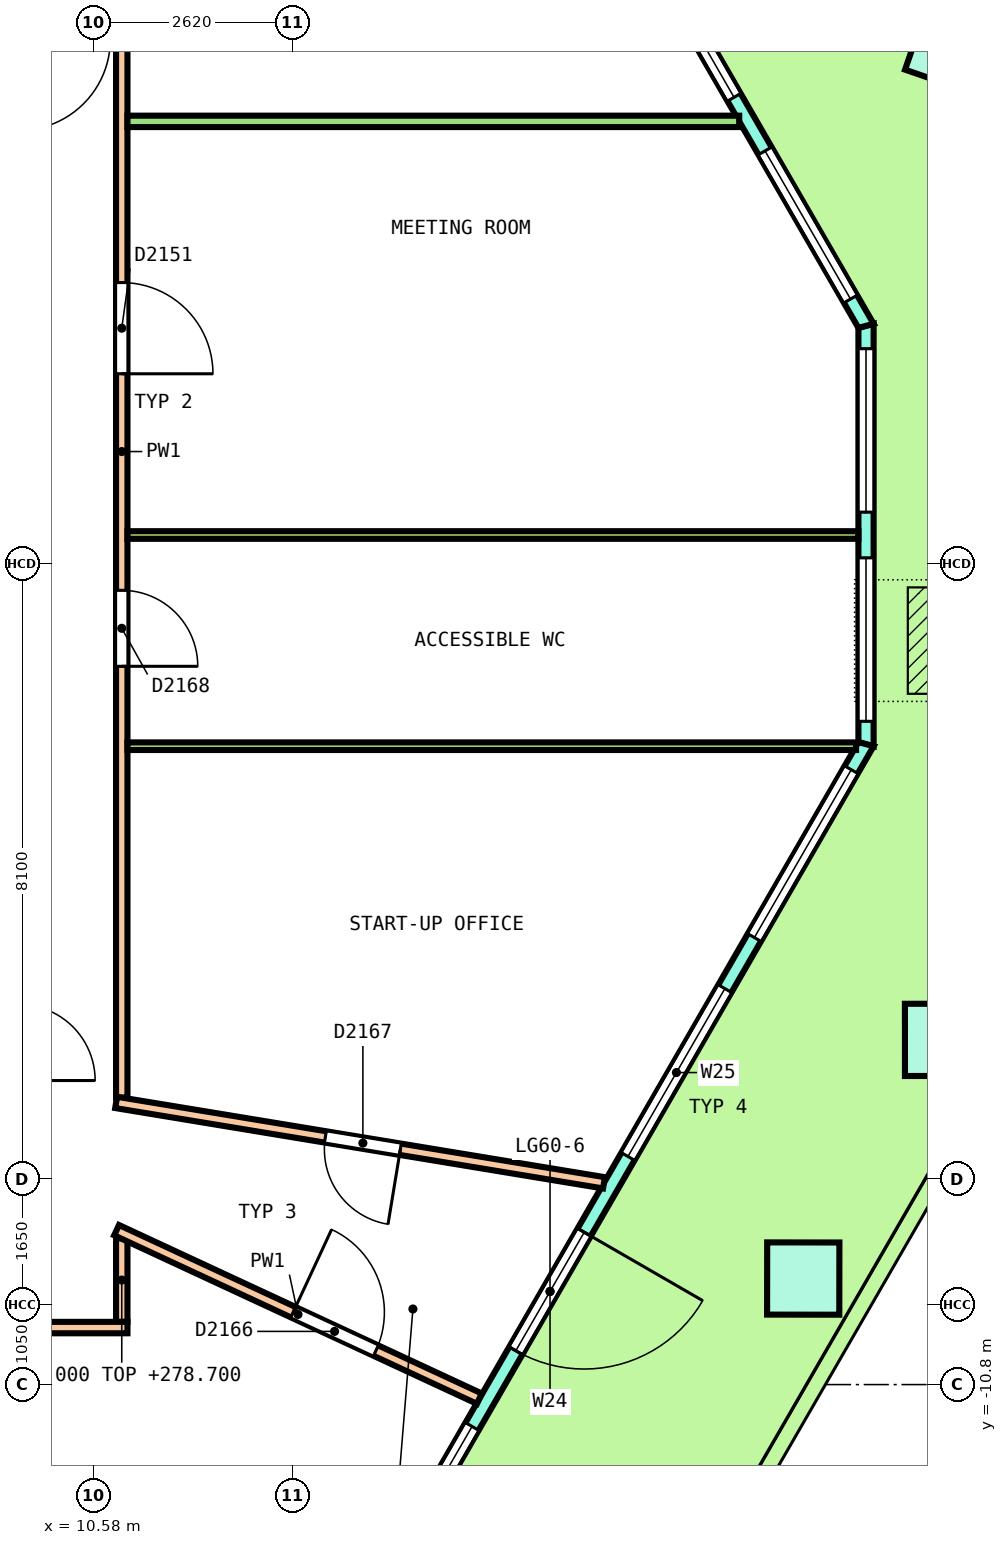
"""IFC4 building model, lengths in metres.
Left out: names, types, materials, properties, quantities, classifications, styles, units other than length and angle.
Written with IfcOpenShell. Run it as: python <this file> out.ifc"""

import sys

from ifc_helpers import new_model, si_unit, direction, frame, frame_2d, origin, origin_2d, place, context, subcontext, project, spatial, polyline, rectangle, outline, extrude, element, fill, save


model = new_model("IFC4")
c1 = context("Model", 3, precision=1e-05, world=origin(), true_north=direction((0.0, 1.0)))
c2 = subcontext(c1, "Body", "Model", "MODEL_VIEW")
j1 = project(units=[si_unit("LENGTHUNIT", "METRE"), si_unit("PLANEANGLEUNIT", "RADIAN")], contexts=[c1])
p1 = place(None, origin())
s1 = spatial("IfcSite", under=j1, at=p1, CompositionType="ELEMENT")
p2 = place(p1, origin())
s2 = spatial("IfcBuilding", under=s1, at=p2, CompositionType="ELEMENT")
p3 = place(p2, frame((0.0, 0.0, 275.0)))
s3 = spatial("IfcBuildingStorey", under=s2, at=p3, CompositionType="ELEMENT", Elevation=275.0)
p4 = place(p3, frame((21.859, 6.793, 0.0), z_axis=(0.021727164481, 0.02506980517, 0.999449566107), x_axis=(-0.500266190079, 0.865803780998, -0.010842134187)))
e1 = element("IfcColumn", 1, at=p4, inside=s3, PredefinedType="COLUMN", context=c2, shape_type="SweptSolid", body=[
    extrude(rectangle(XDim=0.95, YDim=0.95, at=origin_2d()), origin(), (0.0, 0.0, 1.0), 3.652),
])
p5 = place(p3, frame((19.916, -9.405, 0.0), z_axis=(0.003611945175, 0.00628746012, 0.999973710503), x_axis=(0.499382072477, 0.866351526517, -0.007251081967)))
e2 = element("IfcColumn", 2, at=p5, inside=s3, PredefinedType="COLUMN", context=c2, shape_type="SweptSolid", body=[
    extrude(rectangle(XDim=0.95, YDim=0.95, at=origin_2d()), origin(), (0.0, 0.0, 1.0), 3.65),
])
p6 = place(p3, frame((21.729, -6.265, 0.0), z_axis=(0.010900423214, 0.018858400897, 0.999762742599), x_axis=(0.499728924135, 0.865907930491, -0.021782063614)))
e3 = element("IfcColumn", 3, at=p6, inside=s3, PredefinedType="COLUMN", context=c2, shape_type="SweptSolid", body=[
    extrude(rectangle(XDim=0.95, YDim=0.95, at=origin_2d()), origin(), (0.0, 0.0, 1.0), 3.651),
])
p7 = place(p3, frame((20.741, -2.375, 0.0), z_axis=(0.0, 0.0, 1.0), x_axis=(0.0, 1.0, 0.0)))
e4 = element("IfcWall", 4, at=p7, inside=s3, PredefinedType="SOLIDWALL", context=c2, shape_type="SweptSolid", body=[
    extrude(outline(polyline([(-0.027, -0.1), (1.084, -0.1), (2.196, -0.1), (3.307, -0.1), (4.419, -0.1), (5.53, -0.1), (5.477, 0.1), (4.387, 0.1), (3.297, 0.1), (2.207, 0.1), (1.117, 0.1), (0.027, 0.1), (-0.027, -0.1)])), origin(), (0.0, 0.0, 1.0), 3.7),
])
p8 = place(p7, frame((0.301, 0.0, 0.1)))
e5 = element("IfcOpeningElement", 5, at=p8, cuts=e4, PredefinedType="OPENING", context=c2, shape_type="SweptSolid", body=[
    extrude(rectangle(XDim=2.15, YDim=2.75, at=frame_2d((1.075, 1.375))), frame((0.0, 0.11, 0.0), z_axis=(0.0, -1.0, 0.0), x_axis=(1.0, 0.0, 0.0)), (0.0, 0.0, 1.0), 0.22),
])
p9 = place(p7, frame((3.052, 0.0, 0.1)))
e6 = element("IfcOpeningElement", 6, at=p9, cuts=e4, PredefinedType="OPENING", context=c2, shape_type="SweptSolid", body=[
    extrude(rectangle(XDim=2.15, YDim=2.75, at=frame_2d((1.075, 1.375))), frame((0.0, 0.11, 0.0), z_axis=(0.0, -1.0, 0.0), x_axis=(1.0, 0.0, 0.0)), (0.0, 0.0, 1.0), 0.22),
])
p10 = place(p3, frame((20.741, 3.129, 0.0), z_axis=(0.0, 0.0, 1.0), x_axis=(-0.500005204625, 0.866022398872, 0.0)))
e7 = element("IfcWall", 7, at=p10, inside=s3, PredefinedType="SOLIDWALL", context=c2, shape_type="SweptSolid", body=[
    extrude(outline(polyline([(-0.027, -0.1), (0.998, -0.1), (2.023, -0.1), (3.048, -0.1), (4.073, -0.1), (5.098, -0.1), (6.124, -0.1), (7.148, -0.1), (8.174, -0.1), (9.198, -0.1), (10.224, -0.1), (11.249, -0.1), (12.274, -0.1), (13.299, -0.1), (14.324, -0.1), (15.349, -0.1), (15.295, 0.1), (14.277, 0.1), (13.259, 0.1), (12.241, 0.1), (11.224, 0.1), (10.206, 0.1), (9.188, 0.1), (8.17, 0.1), (7.152, 0.1), (6.134, 0.1), (5.116, 0.1), (4.098, 0.1), (3.081, 0.1), (2.063, 0.1), (1.045, 0.1), (0.027, 0.1), (-0.027, -0.1)])), origin(), (0.0, 0.0, 1.0), 3.7),
])
p11 = place(p10, frame((0.407, 0.0, 0.1)))
e8 = element("IfcOpeningElement", 8, at=p11, cuts=e7, PredefinedType="OPENING", context=c2, shape_type="SweptSolid", body=[
    extrude(rectangle(XDim=2.25, YDim=2.75, at=frame_2d((1.125, 1.375))), frame((0.0, 0.11, 0.0), z_axis=(0.0, -1.0, 0.0), x_axis=(1.0, 0.0, 0.0)), (0.0, 0.0, 1.0), 0.22),
])
p12 = place(p10, frame((3.472, 0.0, 0.1)))
e9 = element("IfcOpeningElement", 9, at=p12, cuts=e7, PredefinedType="OPENING", context=c2, shape_type="SweptSolid", body=[
    extrude(rectangle(XDim=2.25, YDim=2.75, at=frame_2d((1.125, 1.375))), frame((0.0, 0.11, 0.0), z_axis=(0.0, -1.0, 0.0), x_axis=(1.0, 0.0, 0.0)), (0.0, 0.0, 1.0), 0.22),
])
p13 = place(p10, frame((6.761, 0.0, 0.0)))
e10 = element("IfcOpeningElement", 10, at=p13, cuts=e7, PredefinedType="OPENING", context=c2, shape_type="SweptSolid", body=[
    extrude(rectangle(XDim=1.8, YDim=2.4, at=frame_2d((0.9, 1.2))), frame((0.0, 0.11, 0.0), z_axis=(0.0, -1.0, 0.0), x_axis=(1.0, 0.0, 0.0)), (0.0, 0.0, 1.0), 0.22),
])
p14 = place(p10, frame((6.761, 0.0, 2.55)))
e11 = element("IfcOpeningElement", 11, at=p14, cuts=e7, PredefinedType="OPENING", context=c2, shape_type="SweptSolid", body=[
    extrude(rectangle(XDim=1.8, YDim=0.3, at=frame_2d((0.9, 0.15))), frame((0.0, 0.11, 0.0), z_axis=(0.0, -1.0, 0.0), x_axis=(1.0, 0.0, 0.0)), (0.0, 0.0, 1.0), 0.22),
])
p15 = place(p10, frame((9.601, 0.0, 0.1)))
e12 = element("IfcOpeningElement", 12, at=p15, cuts=e7, PredefinedType="OPENING", context=c2, shape_type="SweptSolid", body=[
    extrude(rectangle(XDim=2.25, YDim=2.75, at=frame_2d((1.125, 1.375))), frame((0.0, 0.11, 0.0), z_axis=(0.0, -1.0, 0.0), x_axis=(1.0, 0.0, 0.0)), (0.0, 0.0, 1.0), 0.22),
])
p16 = place(p10, frame((12.665, 0.0, 0.1)))
e13 = element("IfcOpeningElement", 13, at=p16, cuts=e7, PredefinedType="OPENING", context=c2, shape_type="SweptSolid", body=[
    extrude(rectangle(XDim=2.25, YDim=2.75, at=frame_2d((1.125, 1.375))), frame((0.0, 0.11, 0.0), z_axis=(0.0, -1.0, 0.0), x_axis=(1.0, 0.0, 0.0)), (0.0, 0.0, 1.0), 0.22),
])
p17 = place(p3, frame((12.427, -16.775, 0.0), z_axis=(0.0, 0.0, 1.0), x_axis=(0.499993580544, 0.866029110027, 0.0)))
e14 = element("IfcWall", 14, at=p17, inside=s3, PredefinedType="SOLIDWALL", context=c2, shape_type="SweptSolid", body=[
    extrude(outline(polyline([(-0.027, -0.1), (1.016, -0.1), (2.058, -0.1), (3.101, -0.1), (4.144, -0.1), (5.186, -0.1), (6.229, -0.1), (7.272, -0.1), (8.314, -0.1), (9.357, -0.1), (10.4, -0.1), (11.442, -0.1), (12.485, -0.1), (13.528, -0.1), (14.57, -0.1), (15.613, -0.1), (16.656, -0.1), (16.602, 0.1), (15.566, 0.1), (14.53, 0.1), (13.494, 0.1), (12.458, 0.1), (11.422, 0.1), (10.386, 0.1), (9.35, 0.1), (8.314, 0.1), (7.278, 0.1), (6.242, 0.1), (5.207, 0.1), (4.171, 0.1), (3.135, 0.1), (2.099, 0.1), (1.063, 0.1), (0.027, 0.1), (-0.027, -0.1)])), origin(), (0.0, 0.0, 1.0), 3.7),
])
p18 = place(p17, frame((0.388, 0.0, 0.1)))
e15 = element("IfcOpeningElement", 15, at=p18, cuts=e14, PredefinedType="OPENING", context=c2, shape_type="SweptSolid", body=[
    extrude(rectangle(XDim=2.55, YDim=2.75, at=frame_2d((1.275, 1.375))), frame((0.0, 0.11, 0.0), z_axis=(0.0, -1.0, 0.0), x_axis=(1.0, 0.0, 0.0)), (0.0, 0.0, 1.0), 0.22),
])
p19 = place(p17, frame((3.714, 0.0, 0.1)))
e16 = element("IfcOpeningElement", 16, at=p19, cuts=e14, PredefinedType="OPENING", context=c2, shape_type="SweptSolid", body=[
    extrude(rectangle(XDim=2.55, YDim=2.75, at=frame_2d((1.275, 1.375))), frame((0.0, 0.11, 0.0), z_axis=(0.0, -1.0, 0.0), x_axis=(1.0, 0.0, 0.0)), (0.0, 0.0, 1.0), 0.22),
])
p20 = place(p17, frame((7.414, 0.0, 0.0)))
e17 = element("IfcOpeningElement", 17, at=p20, cuts=e14, PredefinedType="OPENING", context=c2, shape_type="SweptSolid", body=[
    extrude(rectangle(XDim=1.8, YDim=2.4, at=frame_2d((0.9, 1.2))), frame((0.0, 0.11, 0.0), z_axis=(0.0, -1.0, 0.0), x_axis=(1.0, 0.0, 0.0)), (0.0, 0.0, 1.0), 0.22),
])
p21 = place(p17, frame((7.414, 0.0, 2.55)))
e18 = element("IfcOpeningElement", 18, at=p21, cuts=e14, PredefinedType="OPENING", context=c2, shape_type="SweptSolid", body=[
    extrude(rectangle(XDim=1.8, YDim=0.3, at=frame_2d((0.9, 0.15))), frame((0.0, 0.11, 0.0), z_axis=(0.0, -1.0, 0.0), x_axis=(1.0, 0.0, 0.0)), (0.0, 0.0, 1.0), 0.22),
])
p22 = place(p17, frame((10.365, 0.0, 0.1)))
e19 = element("IfcOpeningElement", 19, at=p22, cuts=e14, PredefinedType="OPENING", context=c2, shape_type="SweptSolid", body=[
    extrude(rectangle(XDim=2.55, YDim=2.75, at=frame_2d((1.275, 1.375))), frame((0.0, 0.11, 0.0), z_axis=(0.0, -1.0, 0.0), x_axis=(1.0, 0.0, 0.0)), (0.0, 0.0, 1.0), 0.22),
])
p23 = place(p17, frame((13.691, 0.0, 0.1)))
e20 = element("IfcOpeningElement", 20, at=p23, cuts=e14, PredefinedType="OPENING", context=c2, shape_type="SweptSolid", body=[
    extrude(rectangle(XDim=2.55, YDim=2.75, at=frame_2d((1.275, 1.375))), frame((0.0, 0.11, 0.0), z_axis=(0.0, -1.0, 0.0), x_axis=(1.0, 0.0, 0.0)), (0.0, 0.0, 1.0), 0.22),
])
p24 = place(p3, frame((10.95, -9.975, 0.0), z_axis=(0.0, 0.0, 1.0), x_axis=(0.0, 1.0, 0.0)))
e21 = element("IfcWall", 21, at=p24, inside=s3, PredefinedType="PARTITIONING", context=c2, shape_type="SweptSolid", body=[
    extrude(rectangle(XDim=1.1, YDim=0.15, at=frame_2d((0.55, 0.0))), origin(), (0.0, 0.0, 1.0), 3.7),
])
p25 = place(p3, frame((10.95, -7.025, 0.0), z_axis=(0.0, 0.0, 1.0), x_axis=(0.0, 1.0, 0.0)))
e22 = element("IfcWall", 22, at=p25, inside=s3, PredefinedType="PARTITIONING", context=c2, shape_type="SweptSolid", body=[
    extrude(rectangle(XDim=17.0, YDim=0.15, at=frame_2d((8.5, 0.0))), origin(), (0.0, 0.0, 1.0), 2.9),
])
p26 = place(p25, frame((9.523, 0.0, 0.0)))
e23 = element("IfcOpeningElement", 23, at=p26, cuts=e22, PredefinedType="OPENING", context=c2, shape_type="SweptSolid", body=[
    extrude(rectangle(XDim=1.2, YDim=2.1, at=frame_2d((0.6, 1.05))), frame((0.0, 0.085, 0.0), z_axis=(0.0, -1.0, 0.0), x_axis=(1.0, 0.0, 0.0)), (0.0, 0.0, 1.0), 0.17),
])
p27 = place(p25, frame((14.459, 0.0, 0.0)))
e24 = element("IfcOpeningElement", 24, at=p27, cuts=e22, PredefinedType="OPENING", context=c2, shape_type="SweptSolid", body=[
    extrude(rectangle(XDim=1.0, YDim=2.1, at=frame_2d((0.5, 1.05))), frame((0.0, 0.085, 0.0), z_axis=(0.0, -1.0, 0.0), x_axis=(1.0, 0.0, 0.0)), (0.0, 0.0, 1.0), 0.17),
])
p28 = place(p25, frame((5.675, 0.0, 0.0)))
e25 = element("IfcOpeningElement", 25, at=p28, cuts=e22, PredefinedType="OPENING", context=c2, shape_type="SweptSolid", body=[
    extrude(rectangle(XDim=1.0, YDim=2.1, at=frame_2d((0.5, 1.05))), frame((0.0, 0.085, 0.0), z_axis=(0.0, -1.0, 0.0), x_axis=(1.0, 0.0, 0.0)), (0.0, 0.0, 1.0), 0.17),
])
p29 = place(p3, frame((-10.9, -10.05, 0.0), z_axis=(0.0, 0.0, 1.0), x_axis=(1.0, 0.0, 0.0)))
e26 = element("IfcWall", 26, at=p29, inside=s3, PredefinedType="PARTITIONING", context=c2, shape_type="SweptSolid", body=[
    extrude(rectangle(XDim=21.925, YDim=0.15, at=frame_2d((10.962, 0.0))), origin(), (0.0, 0.0, 1.0), 2.9),
])
p30 = place(p29, frame((2.519, 0.0, 0.0)))
e27 = element("IfcOpeningElement", 27, at=p30, cuts=e26, PredefinedType="OPENING", context=c2, shape_type="SweptSolid", body=[
    extrude(rectangle(XDim=1.2, YDim=2.1, at=frame_2d((0.6, 1.05))), frame((0.0, 0.085, 0.0), z_axis=(0.0, -1.0, 0.0), x_axis=(1.0, 0.0, 0.0)), (0.0, 0.0, 1.0), 0.17),
])
p31 = place(p29, frame((9.201, 0.0, 0.0)))
e28 = element("IfcOpeningElement", 28, at=p31, cuts=e26, PredefinedType="OPENING", context=c2, shape_type="SweptSolid", body=[
    extrude(rectangle(XDim=1.2, YDim=2.1, at=frame_2d((0.6, 1.05))), frame((0.0, 0.085, 0.0), z_axis=(0.0, -1.0, 0.0), x_axis=(1.0, 0.0, 0.0)), (0.0, 0.0, 1.0), 0.17),
])
p32 = place(p29, frame((16.757, 0.0, 0.0)))
e29 = element("IfcOpeningElement", 29, at=p32, cuts=e26, PredefinedType="OPENING", context=c2, shape_type="SweptSolid", body=[
    extrude(rectangle(XDim=1.0, YDim=2.1, at=frame_2d((0.5, 1.05))), frame((0.0, 0.085, 0.0), z_axis=(0.0, -1.0, 0.0), x_axis=(1.0, 0.0, 0.0)), (0.0, 0.0, 1.0), 0.17),
])
p33 = place(p3, frame((10.882, -8.768, 0.0), z_axis=(0.0, 0.0, 1.0), x_axis=(0.906943772509, -0.421251698521, 0.0)))
e30 = element("IfcWall", 30, at=p33, inside=s3, PredefinedType="PARTITIONING", context=c2, shape_type="SweptSolid", body=[
    extrude(rectangle(XDim=5.262, YDim=0.15, at=frame_2d((2.631, 0.0))), origin(), (0.0, 0.0, 1.0), 2.9),
])
p34 = place(p33, frame((2.562, 0.0, 0.0)))
e31 = element("IfcOpeningElement", 31, at=p34, cuts=e30, PredefinedType="OPENING", context=c2, shape_type="SweptSolid", body=[
    extrude(rectangle(XDim=1.2, YDim=2.1, at=frame_2d((0.6, 1.05))), frame((0.0, 0.085, 0.0), z_axis=(0.0, -1.0, 0.0), x_axis=(1.0, 0.0, 0.0)), (0.0, 0.0, 1.0), 0.17),
])
p35 = place(p3, frame((10.876, -7.088, 0.0), z_axis=(0.0, 0.0, 1.0), x_axis=(0.986693542392, -0.162591061875, 0.0)))
e32 = element("IfcWall", 32, at=p35, inside=s3, PredefinedType="PARTITIONING", context=c2, shape_type="SweptSolid", body=[
    extrude(rectangle(XDim=6.505, YDim=0.15, at=frame_2d((3.252, 0.0))), origin(), (0.0, 0.0, 1.0), 2.9),
])
p36 = place(p35, frame((2.79, 0.0, 0.0)))
e33 = element("IfcOpeningElement", 33, at=p36, cuts=e32, PredefinedType="OPENING", context=c2, shape_type="SweptSolid", body=[
    extrude(rectangle(XDim=1.0, YDim=2.1, at=frame_2d((0.5, 1.05))), frame((0.0, 0.085, 0.0), z_axis=(0.0, -1.0, 0.0), x_axis=(1.0, 0.0, 0.0)), (0.0, 0.0, 1.0), 0.17),
])
p37 = place(p3, frame((11.025, 5.819, 0.0), z_axis=(0.0, 0.0, 1.0), x_axis=(1.0, 0.0, 0.0)))
e34 = element("IfcWall", 34, at=p37, inside=s3, PredefinedType="PARTITIONING", context=c2, shape_type="SweptSolid", body=[
    extrude(rectangle(XDim=8.048, YDim=0.15, at=frame_2d((4.024, 0.0))), origin(), (0.0, 0.0, 1.0), 2.9),
])
p38 = place(p3, frame((11.025, 0.377, 0.0), z_axis=(0.0, 0.0, 1.0), x_axis=(1.0, 0.0, 0.0)))
e35 = element("IfcWall", 35, at=p38, inside=s3, PredefinedType="PARTITIONING", context=c2, shape_type="SweptSolid", body=[
    extrude(rectangle(XDim=9.617, YDim=0.1, at=frame_2d((4.808, 0.0))), origin(), (0.0, 0.0, 1.0), 2.9),
])
p39 = place(p3, frame((11.025, -2.401, 0.0), z_axis=(0.0, 0.0, 1.0), x_axis=(1.0, 0.0, 0.0)))
e36 = element("IfcWall", 36, at=p39, inside=s3, PredefinedType="PARTITIONING", context=c2, shape_type="SweptSolid", body=[
    extrude(rectangle(XDim=9.586, YDim=0.1, at=frame_2d((4.793, 0.0))), origin(), (0.0, 0.0, 1.0), 2.9),
])
p40 = place(p8, origin())
e37 = element("IfcWindow", 37, at=p40, inside=s3, PartitioningType="SINGLE_PANEL", PredefinedType="WINDOW", context=c2, shape_type="SweptSolid", body=[
    extrude(rectangle(XDim=2.15, YDim=2.75, at=frame_2d((1.075, 1.375))), frame((0.0, 0.03, 0.0), z_axis=(0.0, -1.0, 0.0), x_axis=(1.0, 0.0, 0.0)), (0.0, 0.0, 1.0), 0.06),
])
fill(e5, e37)
p41 = place(p9, origin())
e38 = element("IfcWindow", 38, at=p41, inside=s3, PartitioningType="SINGLE_PANEL", PredefinedType="WINDOW", context=c2, shape_type="SweptSolid", body=[
    extrude(rectangle(XDim=2.15, YDim=2.75, at=frame_2d((1.075, 1.375))), frame((0.0, 0.03, 0.0), z_axis=(0.0, -1.0, 0.0), x_axis=(1.0, 0.0, 0.0)), (0.0, 0.0, 1.0), 0.06),
])
fill(e6, e38)
p42 = place(p11, origin())
e39 = element("IfcWindow", 39, at=p42, inside=s3, PartitioningType="SINGLE_PANEL", PredefinedType="WINDOW", context=c2, shape_type="SweptSolid", body=[
    extrude(rectangle(XDim=2.25, YDim=2.75, at=frame_2d((1.125, 1.375))), frame((0.0, 0.03, 0.0), z_axis=(0.0, -1.0, 0.0), x_axis=(1.0, 0.0, 0.0)), (0.0, 0.0, 1.0), 0.06),
])
fill(e8, e39)
p43 = place(p12, origin())
e40 = element("IfcWindow", 40, at=p43, inside=s3, PartitioningType="SINGLE_PANEL", PredefinedType="WINDOW", context=c2, shape_type="SweptSolid", body=[
    extrude(rectangle(XDim=2.25, YDim=2.75, at=frame_2d((1.125, 1.375))), frame((0.0, 0.03, 0.0), z_axis=(0.0, -1.0, 0.0), x_axis=(1.0, 0.0, 0.0)), (0.0, 0.0, 1.0), 0.06),
])
fill(e9, e40)
p44 = place(p19, origin())
e41 = element("IfcWindow", 41, at=p44, inside=s3, PartitioningType="SINGLE_PANEL", PredefinedType="WINDOW", context=c2, shape_type="SweptSolid", body=[
    extrude(rectangle(XDim=2.55, YDim=2.75, at=frame_2d((1.275, 1.375))), frame((0.0, 0.03, 0.0), z_axis=(0.0, -1.0, 0.0), x_axis=(1.0, 0.0, 0.0)), (0.0, 0.0, 1.0), 0.06),
])
fill(e16, e41)
p45 = place(p20, origin())
e42 = element("IfcDoor", 42, at=p45, inside=s3, OperationType="DOUBLE_DOOR_SINGLE_SWING", PredefinedType="DOOR", context=c2, shape_type="SweptSolid", body=[
    extrude(rectangle(XDim=1.8, YDim=2.4, at=frame_2d((0.9, 1.2))), frame((0.0, 0.025, 0.0), z_axis=(0.0, -1.0, 0.0), x_axis=(1.0, 0.0, 0.0)), (0.0, 0.0, 1.0), 0.05),
])
fill(e17, e42)
p46 = place(p21, origin())
e43 = element("IfcWindow", 43, at=p46, inside=s3, PartitioningType="SINGLE_PANEL", PredefinedType="WINDOW", context=c2, shape_type="SweptSolid", body=[
    extrude(rectangle(XDim=1.8, YDim=0.3, at=frame_2d((0.9, 0.15))), frame((0.0, 0.03, 0.0), z_axis=(0.0, -1.0, 0.0), x_axis=(1.0, 0.0, 0.0)), (0.0, 0.0, 1.0), 0.06),
])
fill(e18, e43)
p47 = place(p22, origin())
e44 = element("IfcWindow", 44, at=p47, inside=s3, PartitioningType="SINGLE_PANEL", PredefinedType="WINDOW", context=c2, shape_type="SweptSolid", body=[
    extrude(rectangle(XDim=2.55, YDim=2.75, at=frame_2d((1.275, 1.375))), frame((0.0, 0.03, 0.0), z_axis=(0.0, -1.0, 0.0), x_axis=(1.0, 0.0, 0.0)), (0.0, 0.0, 1.0), 0.06),
])
fill(e19, e44)
p48 = place(p23, origin())
e45 = element("IfcWindow", 45, at=p48, inside=s3, PartitioningType="SINGLE_PANEL", PredefinedType="WINDOW", context=c2, shape_type="SweptSolid", body=[
    extrude(rectangle(XDim=2.55, YDim=2.75, at=frame_2d((1.275, 1.375))), frame((0.0, 0.03, 0.0), z_axis=(0.0, -1.0, 0.0), x_axis=(1.0, 0.0, 0.0)), (0.0, 0.0, 1.0), 0.06),
])
fill(e20, e45)
p49 = place(p26, origin())
e46 = element("IfcDoor", 46, at=p49, inside=s3, OperationType="DOUBLE_DOOR_SINGLE_SWING", PredefinedType="DOOR", context=c2, shape_type="SweptSolid", body=[
    extrude(rectangle(XDim=1.2, YDim=2.1, at=frame_2d((0.6, 1.05))), frame((0.0, 0.025, 0.0), z_axis=(0.0, -1.0, 0.0), x_axis=(1.0, 0.0, 0.0)), (0.0, 0.0, 1.0), 0.05),
])
fill(e23, e46)
p50 = place(p34, origin())
e47 = element("IfcDoor", 47, at=p50, inside=s3, OperationType="DOUBLE_DOOR_SINGLE_SWING", PredefinedType="DOOR", context=c2, shape_type="SweptSolid", body=[
    extrude(rectangle(XDim=1.2, YDim=2.1, at=frame_2d((0.6, 1.05))), frame((0.0, 0.025, 0.0), z_axis=(0.0, -1.0, 0.0), x_axis=(1.0, 0.0, 0.0)), (0.0, 0.0, 1.0), 0.05),
])
fill(e31, e47)
p51 = place(p36, origin())
e48 = element("IfcDoor", 48, at=p51, inside=s3, OperationType="SINGLE_SWING_LEFT", PredefinedType="DOOR", context=c2, shape_type="SweptSolid", body=[
    extrude(rectangle(XDim=1.0, YDim=2.1, at=frame_2d((0.5, 1.05))), frame((0.0, 0.025, 0.0), z_axis=(0.0, -1.0, 0.0), x_axis=(1.0, 0.0, 0.0)), (0.0, 0.0, 1.0), 0.05),
])
fill(e33, e48)
p52 = place(p28, origin())
e49 = element("IfcDoor", 49, at=p52, inside=s3, OperationType="SINGLE_SWING_RIGHT", PredefinedType="DOOR", context=c2, shape_type="SweptSolid", body=[
    extrude(rectangle(XDim=1.0, YDim=2.1, at=frame_2d((0.5, 1.05))), frame((0.0, 0.025, 0.0), z_axis=(0.0, -1.0, 0.0), x_axis=(1.0, 0.0, 0.0)), (0.0, 0.0, 1.0), 0.05),
])
fill(e25, e49)
save(model, sys.argv[1])
